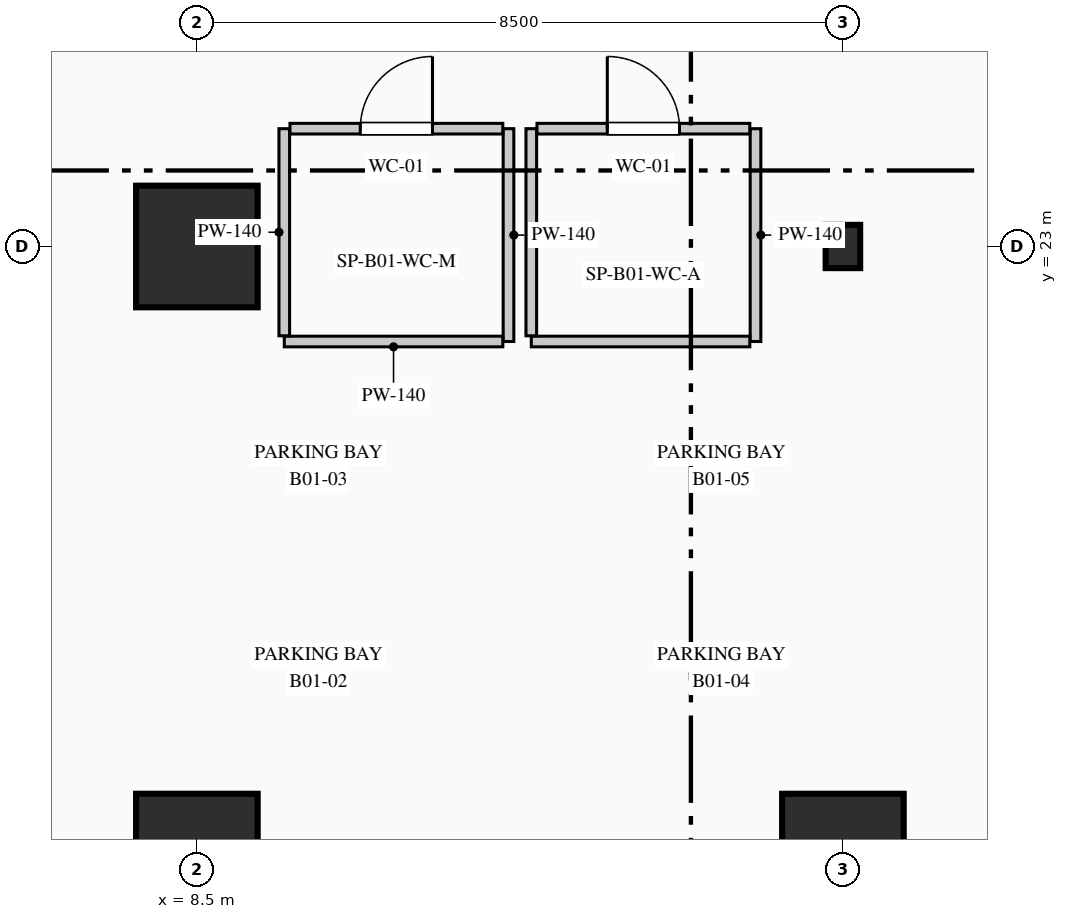
"""IFC4 building model, lengths in metres.
Left out: names, types, materials, properties, quantities, classifications, styles, units other than length and angle.
Written with IfcOpenShell. Run it as: python <this file> out.ifc"""

import sys

from ifc_helpers import new_model, si_unit, direction, frame, frame_2d, origin, origin_2d, place, context, subcontext, project, spatial, rectangle, i_section, extrude, element, fill, save


model = new_model("IFC4")
c1 = context("Model", 3, precision=1e-05, world=origin(), true_north=direction((0.0, 1.0)))
c2 = subcontext(c1, "Body", "Model", "MODEL_VIEW")
j1 = project(units=[si_unit("LENGTHUNIT", "METRE"), si_unit("PLANEANGLEUNIT", "RADIAN")], contexts=[c1])
p1 = place(None, origin())
s1 = spatial("IfcSite", under=j1, at=p1, CompositionType="ELEMENT")
p2 = place(p1, origin())
s2 = spatial("IfcBuilding", under=s1, at=p2, CompositionType="ELEMENT")
p3 = place(p2, frame((0.0, 0.0, -4.5)))
s3 = spatial("IfcBuildingStorey", under=s2, at=p3, CompositionType="ELEMENT", Elevation=-4.5)
for number, where, z_axis, x_axis in (
    (1, (8.5, 15.0, 0.0), (0.0, 0.0, 1.0), (1.0, 0.0, 0.0)),
    (2, (8.5, 23.0, 0.0), (0.0, 0.0, 1.0), (1.0, 0.0, 0.0)),
    (3, (17.0, 15.0, 0.0), (0.0, 0.0, 1.0), (1.0, 0.0, 0.0)),
):
    element("IfcColumn", number, at=place(p3, frame(where, z_axis=z_axis, x_axis=x_axis)), inside=s3, PredefinedType="COLUMN", context=c2, shape_type="SweptSolid", body=[
        extrude(rectangle(XDim=1.6, YDim=1.6, at=origin_2d()), origin(), (0.0, 0.0, 1.0), 4.5),
    ])
p4 = place(p3, frame((17.0, 23.0, 0.0), z_axis=(0.0, 0.0, 1.0), x_axis=(1.0, 0.0, 0.0)))
e4 = element("IfcColumn", 4, at=p4, inside=s3, PredefinedType="COLUMN", context=c2, shape_type="SweptSolid", body=[
    extrude(i_section(OverallWidth=0.454, OverallDepth=0.569, WebThickness=0.078, FlangeThickness=0.08, FilletRadius=0.015, at=origin_2d()), origin(), (0.0, 0.0, 1.0), 4.5),
])
p5 = place(p3, frame((12.6, 24.55, 0.0), z_axis=(0.0, 0.0, 1.0), x_axis=(0.0, -1.0, 0.0)))
e5 = element("IfcWall", 5, at=p5, inside=s3, PredefinedType="PARTITIONING", context=c2, shape_type="SweptSolid", body=[
    extrude(rectangle(XDim=2.8, YDim=0.14, at=frame_2d((1.4, 0.0))), origin(), (0.0, 0.0, 1.0), 3.65),
])
p6 = place(p3, frame((12.525, 21.75, 0.0), z_axis=(0.0, 0.0, 1.0), x_axis=(-1.0, 0.0, 0.0)))
e6 = element("IfcWall", 6, at=p6, inside=s3, PredefinedType="PARTITIONING", context=c2, shape_type="SweptSolid", body=[
    extrude(rectangle(XDim=2.875, YDim=0.14, at=frame_2d((1.438, 0.0))), origin(), (0.0, 0.0, 1.0), 4.165),
])
p7 = place(p3, frame((9.65, 21.825, 0.0), z_axis=(0.0, 0.0, 1.0), x_axis=(0.0, 1.0, 0.0)))
e7 = element("IfcWall", 7, at=p7, inside=s3, PredefinedType="PARTITIONING", context=c2, shape_type="SweptSolid", body=[
    extrude(rectangle(XDim=2.725, YDim=0.14, at=frame_2d((1.363, 0.0))), origin(), (0.0, 0.0, 1.0), 3.65),
])
p8 = place(p3, frame((9.725, 24.55, 0.0), z_axis=(0.0, 0.0, 1.0), x_axis=(1.0, 0.0, 0.0)))
e8 = element("IfcWall", 8, at=p8, inside=s3, PredefinedType="PARTITIONING", context=c2, shape_type="SweptSolid", body=[
    extrude(rectangle(XDim=2.8, YDim=0.14, at=frame_2d((1.4, 0.0))), origin(), (0.0, 0.0, 1.0), 4.165),
])
p9 = place(p8, frame((0.925, 0.0, 0.0)))
e9 = element("IfcOpeningElement", 9, at=p9, cuts=e8, PredefinedType="OPENING", context=c2, shape_type="SweptSolid", body=[
    extrude(rectangle(XDim=0.95, YDim=2.15, at=frame_2d((0.475, 1.075))), frame((0.0, 0.08, 0.0), z_axis=(0.0, -1.0, 0.0), x_axis=(1.0, 0.0, 0.0)), (0.0, 0.0, 1.0), 0.16),
])
p10 = place(p3, frame((15.85, 24.55, 0.0), z_axis=(0.0, 0.0, 1.0), x_axis=(0.0, -1.0, 0.0)))
e10 = element("IfcWall", 10, at=p10, inside=s3, PredefinedType="PARTITIONING", context=c2, shape_type="SweptSolid", body=[
    extrude(rectangle(XDim=2.8, YDim=0.14, at=frame_2d((1.4, 0.0))), origin(), (0.0, 0.0, 1.0), 3.65),
])
p11 = place(p3, frame((15.775, 21.75, 0.0), z_axis=(0.0, 0.0, 1.0), x_axis=(-1.0, 0.0, 0.0)))
e11 = element("IfcWall", 11, at=p11, inside=s3, PredefinedType="PARTITIONING", context=c2, shape_type="SweptSolid", body=[
    extrude(rectangle(XDim=2.875, YDim=0.14, at=frame_2d((1.438, 0.0))), origin(), (0.0, 0.0, 1.0), 4.165),
])
p12 = place(p3, frame((12.9, 21.825, 0.0), z_axis=(0.0, 0.0, 1.0), x_axis=(0.0, 1.0, 0.0)))
e12 = element("IfcWall", 12, at=p12, inside=s3, PredefinedType="PARTITIONING", context=c2, shape_type="SweptSolid", body=[
    extrude(rectangle(XDim=2.725, YDim=0.14, at=frame_2d((1.363, 0.0))), origin(), (0.0, 0.0, 1.0), 3.65),
])
p13 = place(p3, frame((12.975, 24.55, 0.0), z_axis=(0.0, 0.0, 1.0), x_axis=(1.0, 0.0, 0.0)))
e13 = element("IfcWall", 13, at=p13, inside=s3, PredefinedType="PARTITIONING", context=c2, shape_type="SweptSolid", body=[
    extrude(rectangle(XDim=2.8, YDim=0.14, at=frame_2d((1.4, 0.0))), origin(), (0.0, 0.0, 1.0), 4.165),
])
p14 = place(p13, frame((0.925, 0.0, 0.0)))
e14 = element("IfcOpeningElement", 14, at=p14, cuts=e13, PredefinedType="OPENING", context=c2, shape_type="SweptSolid", body=[
    extrude(rectangle(XDim=0.95, YDim=2.15, at=frame_2d((0.475, 1.075))), frame((0.0, 0.08, 0.0), z_axis=(0.0, -1.0, 0.0), x_axis=(1.0, 0.0, 0.0)), (0.0, 0.0, 1.0), 0.16),
])
p15 = place(p9, origin())
e15 = element("IfcDoor", 15, at=p15, inside=s3, OperationType="SINGLE_SWING_RIGHT", PredefinedType="DOOR", context=c2, shape_type="SweptSolid", body=[
    extrude(rectangle(XDim=0.95, YDim=2.15, at=frame_2d((0.475, 1.075))), frame((0.0, 0.025, 0.0), z_axis=(0.0, -1.0, 0.0), x_axis=(1.0, 0.0, 0.0)), (0.0, 0.0, 1.0), 0.05),
])
fill(e9, e15)
p16 = place(p14, origin())
e16 = element("IfcDoor", 16, at=p16, inside=s3, OperationType="SINGLE_SWING_LEFT", PredefinedType="DOOR", context=c2, shape_type="SweptSolid", body=[
    extrude(rectangle(XDim=0.95, YDim=2.15, at=frame_2d((0.475, 1.075))), frame((0.0, 0.025, 0.0), z_axis=(0.0, -1.0, 0.0), x_axis=(1.0, 0.0, 0.0)), (0.0, 0.0, 1.0), 0.05),
])
fill(e14, e16)
save(model, sys.argv[1])
